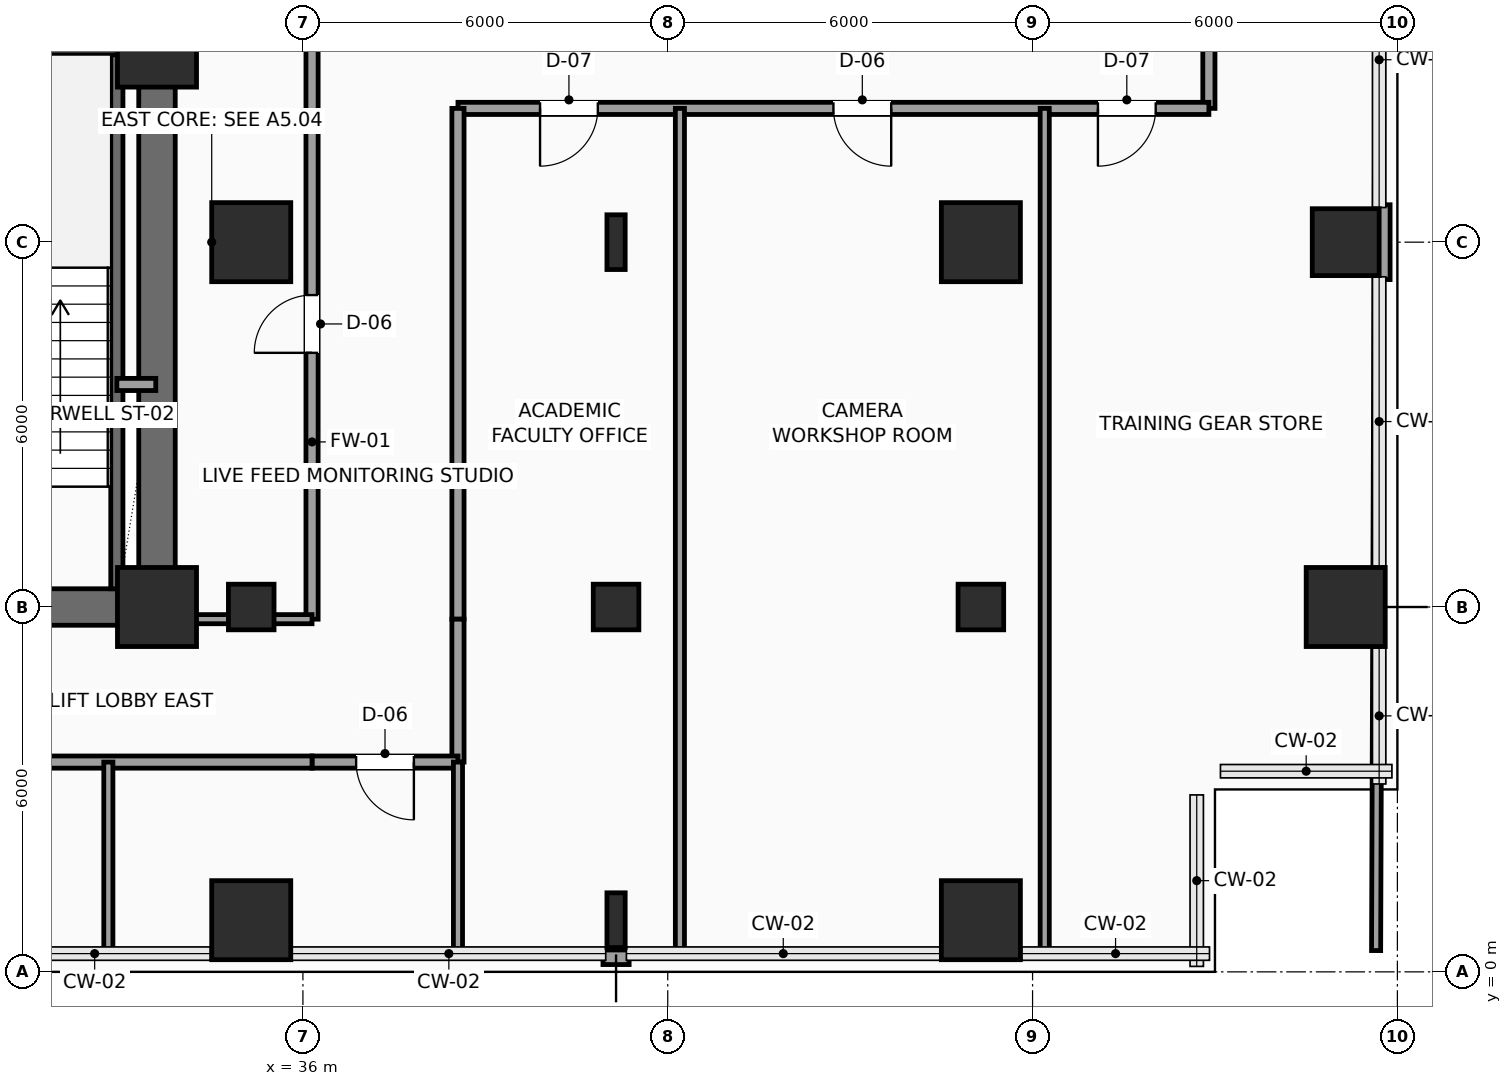
"""IFC4 building model, lengths in metres.
Left out: names, types, materials, properties, quantities, classifications, styles, units other than length and angle.
Written with IfcOpenShell. Run it as: python <this file> out.ifc"""

import sys

from ifc_helpers import new_model, si_unit, direction, frame, frame_2d, origin, origin_2d, place, context, subcontext, project, spatial, rectangle, hollow_rectangle, i_section, extrude, element, fill, save


model = new_model("IFC4")
c1 = context("Model", 3, precision=1e-05, world=origin(), true_north=direction((0.0, 1.0)))
c2 = subcontext(c1, "Body", "Model", "MODEL_VIEW")
j1 = project(units=[si_unit("LENGTHUNIT", "METRE"), si_unit("PLANEANGLEUNIT", "RADIAN")], contexts=[c1])
p1 = place(None, origin())
s1 = spatial("IfcSite", under=j1, at=p1, CompositionType="ELEMENT")
p2 = place(p1, origin())
s2 = spatial("IfcBuilding", under=s1, at=p2, CompositionType="ELEMENT")
p3 = place(p2, frame((0.0, 0.0, 63.6)))
s3 = spatial("IfcBuildingStorey", under=s2, at=p3, CompositionType="ELEMENT", Elevation=63.6)
for number, where, z_axis, x_axis in (
    (1, (33.6, 6.0, 0.0), (0.0, 0.0, 1.0), (1.0, 0.0, 0.0)),
    (2, (33.6, 15.2, 0.0), (0.0, 0.0, 1.0), (1.0, 0.0, 0.0)),
    (3, (35.15, 0.85, 0.0), (0.0, 0.0, 1.0), (1.0, 0.0, 0.0)),
):
    element("IfcColumn", number, at=place(p3, frame(where, z_axis=z_axis, x_axis=x_axis)), inside=s3, PredefinedType="COLUMN", context=c2, shape_type="SweptSolid", body=[
        extrude(rectangle(XDim=1.3, YDim=1.3, at=origin_2d()), origin(), (0.0, 0.0, 1.0), 3.9),
    ])
p4 = place(p3, frame((35.15, 6.0, 0.0), z_axis=(0.0, 0.0, 1.0), x_axis=(1.0, 0.0, 0.0)))
e4 = element("IfcColumn", 4, at=p4, inside=s3, PredefinedType="COLUMN", context=c2, shape_type="SweptSolid", body=[
    extrude(hollow_rectangle(XDim=0.75, YDim=0.75, WallThickness=0.035, InnerFilletRadius=0.035, OuterFilletRadius=0.05, at=origin_2d()), origin(), (0.0, 0.0, 1.0), 3.9),
])
p5 = place(p3, frame((35.15, 12.0, 0.0), z_axis=(0.0, 0.0, 1.0), x_axis=(1.0, 0.0, 0.0)))
e5 = element("IfcColumn", 5, at=p5, inside=s3, PredefinedType="COLUMN", context=c2, shape_type="SweptSolid", body=[
    extrude(rectangle(XDim=1.3, YDim=1.3, at=origin_2d()), origin(), (0.0, 0.0, 1.0), 3.9),
])
p6 = place(p3, frame((41.15, 0.85, 0.0), z_axis=(0.0, 0.0, 1.0), x_axis=(1.0, 0.0, 0.0)))
e6 = element("IfcColumn", 6, at=p6, inside=s3, PredefinedType="COLUMN", context=c2, shape_type="SweptSolid", body=[
    extrude(i_section(OverallWidth=0.3, OverallDepth=0.9, WebThickness=0.019, FlangeThickness=0.035, FilletRadius=0.03, at=origin_2d()), origin(), (0.0, 0.0, 1.0), 3.9),
])
p7 = place(p3, frame((41.15, 6.0, 0.0), z_axis=(0.0, 0.0, 1.0), x_axis=(1.0, 0.0, 0.0)))
e7 = element("IfcColumn", 7, at=p7, inside=s3, PredefinedType="COLUMN", context=c2, shape_type="SweptSolid", body=[
    extrude(hollow_rectangle(XDim=0.75, YDim=0.75, WallThickness=0.035, InnerFilletRadius=0.035, OuterFilletRadius=0.05, at=origin_2d()), origin(), (0.0, 0.0, 1.0), 3.9),
])
p8 = place(p3, frame((41.15, 12.0, 0.0), z_axis=(0.0, 0.0, 1.0), x_axis=(1.0, 0.0, 0.0)))
e8 = element("IfcColumn", 8, at=p8, inside=s3, PredefinedType="COLUMN", context=c2, shape_type="SweptSolid", body=[
    extrude(i_section(OverallWidth=0.3, OverallDepth=0.9, WebThickness=0.019, FlangeThickness=0.035, FilletRadius=0.03, at=origin_2d()), origin(), (0.0, 0.0, 1.0), 3.9),
])
p9 = place(p3, frame((47.15, 0.85, 0.0), z_axis=(0.0, 0.0, 1.0), x_axis=(1.0, 0.0, 0.0)))
e9 = element("IfcColumn", 9, at=p9, inside=s3, PredefinedType="COLUMN", context=c2, shape_type="SweptSolid", body=[
    extrude(rectangle(XDim=1.3, YDim=1.3, at=origin_2d()), origin(), (0.0, 0.0, 1.0), 3.9),
])
p10 = place(p3, frame((47.15, 6.0, 0.0), z_axis=(0.0, 0.0, 1.0), x_axis=(1.0, 0.0, 0.0)))
e10 = element("IfcColumn", 10, at=p10, inside=s3, PredefinedType="COLUMN", context=c2, shape_type="SweptSolid", body=[
    extrude(hollow_rectangle(XDim=0.75, YDim=0.75, WallThickness=0.035, InnerFilletRadius=0.035, OuterFilletRadius=0.05, at=origin_2d()), origin(), (0.0, 0.0, 1.0), 3.9),
])
for number, where, z_axis, x_axis in (
    (11, (47.15, 12.0, 0.0), (0.0, 0.0, 1.0), (1.0, 0.0, 0.0)),
    (12, (53.15, 6.0, 0.0), (0.0, 0.0, 1.0), (1.0, 0.0, 0.0)),
):
    element("IfcColumn", number, at=place(p3, frame(where, z_axis=z_axis, x_axis=x_axis)), inside=s3, PredefinedType="COLUMN", context=c2, shape_type="SweptSolid", body=[
        extrude(rectangle(XDim=1.3, YDim=1.3, at=origin_2d()), origin(), (0.0, 0.0, 1.0), 3.9),
    ])
p11 = place(p3, frame((53.15, 12.0, 0.0), z_axis=(0.0, 0.0, 1.0), x_axis=(1.0, 0.0, 0.0)))
e13 = element("IfcColumn", 13, at=p11, inside=s3, PredefinedType="COLUMN", context=c2, shape_type="SweptSolid", body=[
    extrude(rectangle(XDim=1.1, YDim=1.1, at=origin_2d()), origin(), (0.0, 0.0, 1.0), 3.9),
])
p12 = place(p3, frame((53.76, 12.615, 0.0), z_axis=(0.0, 0.0, 1.0), x_axis=(0.0, -1.0, 0.0)))
e14 = element("IfcWall", 14, at=p12, inside=s3, PredefinedType="SOLIDWALL", context=c2, shape_type="SweptSolid", body=[
    extrude(rectangle(XDim=1.23, YDim=0.24, at=frame_2d((0.615, 0.0))), origin(), (0.0, 0.0, 1.0), 3.65),
])
p13 = place(p3, frame((41.365, 0.24, 0.0), z_axis=(0.0, 0.0, 1.0), x_axis=(-1.0, 0.0, 0.0)))
e15 = element("IfcWall", 15, at=p13, inside=s3, PredefinedType="SOLIDWALL", context=c2, shape_type="SweptSolid", body=[
    extrude(rectangle(XDim=0.43, YDim=0.24, at=frame_2d((0.215, 0.0))), origin(), (0.0, 0.0, 1.0), 3.65),
])
p14 = place(p3, frame((24.0, 6.0, 0.0), z_axis=(0.0, 0.0, 1.0), x_axis=(1.0, 0.0, 0.0)))
e16 = element("IfcWall", 16, at=p14, inside=s3, PredefinedType="SHEAR", context=c2, shape_type="SweptSolid", body=[
    extrude(rectangle(XDim=9.6, YDim=0.6, at=frame_2d((4.8, 0.0))), origin(), (0.0, 0.0, 1.0), 3.65),
])
p15 = place(p3, frame((33.6, 6.0, 0.0), z_axis=(0.0, 0.0, 1.0), x_axis=(0.0, 1.0, 0.0)))
e17 = element("IfcWall", 17, at=p15, inside=s3, PredefinedType="SHEAR", context=c2, shape_type="SweptSolid", body=[
    extrude(rectangle(XDim=12.0, YDim=0.6, at=frame_2d((6.0, 0.0))), origin(), (0.0, 0.0, 1.0), 3.65),
])
p16 = place(p15, frame((10.2, 0.0, 0.0)))
e18 = element("IfcOpeningElement", 18, at=p16, cuts=e17, PredefinedType="OPENING", context=c2, shape_type="SweptSolid", body=[
    extrude(rectangle(XDim=0.9, YDim=2.15, at=frame_2d((0.45, 1.075))), frame((0.0, 0.31, 0.0), z_axis=(0.0, -1.0, 0.0), x_axis=(1.0, 0.0, 0.0)), (0.0, 0.0, 1.0), 0.62),
])
p17 = place(p3, frame((32.94, 6.3, 0.0), z_axis=(0.0, 0.0, 1.0), x_axis=(0.0, 1.0, 0.0)))
e19 = element("IfcWall", 19, at=p17, inside=s3, PredefinedType="SHEAR", context=c2, shape_type="SweptSolid", body=[
    extrude(rectangle(XDim=8.88, YDim=0.2, at=frame_2d((4.44, 0.0))), origin(), (0.0, 0.0, 1.0), 3.65),
])
p18 = place(p3, frame((29.26, 15.18, 0.0), z_axis=(0.0, 0.0, 1.0), x_axis=(1.0, 0.0, 0.0)))
e20 = element("IfcWall", 20, at=p18, inside=s3, PredefinedType="SHEAR", context=c2, shape_type="SweptSolid", body=[
    extrude(rectangle(XDim=4.04, YDim=0.2, at=frame_2d((2.02, 0.0))), origin(), (0.0, 0.0, 1.0), 3.65),
])
p19 = place(p3, frame((32.94, 9.66, 0.0), z_axis=(0.0, 0.0, 1.0), x_axis=(1.0, 0.0, 0.0)))
e21 = element("IfcWall", 21, at=p19, inside=s3, PredefinedType="SOLIDWALL", context=c2, shape_type="SweptSolid", body=[
    extrude(rectangle(XDim=0.64, YDim=0.2, at=frame_2d((0.32, 0.0))), origin(), (0.0, 0.0, 1.0), 3.65),
])
p20 = place(p3, frame((36.15, 5.8, 0.0), z_axis=(0.0, 0.0, 1.0), x_axis=(0.0, 1.0, 0.0)))
e22 = element("IfcWall", 22, at=p20, inside=s3, PredefinedType="SOLIDWALL", context=c2, shape_type="SweptSolid", body=[
    extrude(rectangle(XDim=10.08, YDim=0.2, at=frame_2d((5.04, 0.0))), origin(), (0.0, 0.0, 1.0), 3.65),
])
p21 = place(p20, frame((4.38, 0.0, 0.0)))
e23 = element("IfcOpeningElement", 23, at=p21, cuts=e22, PredefinedType="OPENING", context=c2, shape_type="SweptSolid", body=[
    extrude(rectangle(XDim=0.95, YDim=2.15, at=frame_2d((0.475, 1.075))), frame((0.0, 0.11, 0.0), z_axis=(0.0, -1.0, 0.0), x_axis=(1.0, 0.0, 0.0)), (0.0, 0.0, 1.0), 0.22),
])
p22 = place(p3, frame((50.9, 16.55, 0.0), z_axis=(0.0, 0.0, 1.0), x_axis=(0.0, -1.0, 0.0)))
e24 = element("IfcWall", 24, at=p22, inside=s3, PredefinedType="SOLIDWALL", context=c2, shape_type="SweptSolid", body=[
    extrude(rectangle(XDim=2.35, YDim=0.2, at=frame_2d((1.175, 0.0))), origin(), (0.0, 0.0, 1.0), 3.65),
])
p23 = place(p3, frame((50.9, 14.2, 0.0), z_axis=(0.0, 0.0, 1.0), x_axis=(-1.0, 0.0, 0.0)))
e25 = element("IfcWall", 25, at=p23, inside=s3, PredefinedType="SOLIDWALL", context=c2, shape_type="SweptSolid", body=[
    extrude(rectangle(XDim=12.35, YDim=0.2, at=frame_2d((6.175, 0.0))), origin(), (0.0, 0.0, 1.0), 3.65),
])
p24 = place(p23, frame((10.05, 0.0, 0.0)))
e26 = element("IfcOpeningElement", 26, at=p24, cuts=e25, PredefinedType="OPENING", context=c2, shape_type="SweptSolid", body=[
    extrude(rectangle(XDim=0.95, YDim=2.15, at=frame_2d((0.475, 1.075))), frame((0.0, 0.11, 0.0), z_axis=(0.0, -1.0, 0.0), x_axis=(1.0, 0.0, 0.0)), (0.0, 0.0, 1.0), 0.22),
])
p25 = place(p23, frame((5.225, 0.0, 0.0)))
e27 = element("IfcOpeningElement", 27, at=p25, cuts=e25, PredefinedType="OPENING", context=c2, shape_type="SweptSolid", body=[
    extrude(rectangle(XDim=0.95, YDim=2.15, at=frame_2d((0.475, 1.075))), frame((0.0, 0.11, 0.0), z_axis=(0.0, -1.0, 0.0), x_axis=(1.0, 0.0, 0.0)), (0.0, 0.0, 1.0), 0.22),
])
p26 = place(p23, frame((0.875, 0.0, 0.0)))
e28 = element("IfcOpeningElement", 28, at=p26, cuts=e25, PredefinedType="OPENING", context=c2, shape_type="SweptSolid", body=[
    extrude(rectangle(XDim=0.95, YDim=2.15, at=frame_2d((0.475, 1.075))), frame((0.0, 0.11, 0.0), z_axis=(0.0, -1.0, 0.0), x_axis=(1.0, 0.0, 0.0)), (0.0, 0.0, 1.0), 0.22),
])
p27 = place(p3, frame((38.55, 14.2, 0.0), z_axis=(0.0, 0.0, 1.0), x_axis=(0.0, -1.0, 0.0)))
e29 = element("IfcWall", 29, at=p27, inside=s3, PredefinedType="SOLIDWALL", context=c2, shape_type="SweptSolid", body=[
    extrude(rectangle(XDim=8.4, YDim=0.2, at=frame_2d((4.2, 0.0))), origin(), (0.0, 0.0, 1.0), 3.65),
])
p28 = place(p3, frame((38.55, 5.8, 0.0), z_axis=(0.0, 0.0, 1.0), x_axis=(0.0, -1.0, 0.0)))
e30 = element("IfcWall", 30, at=p28, inside=s3, PredefinedType="SOLIDWALL", context=c2, shape_type="SweptSolid", body=[
    extrude(rectangle(XDim=2.35, YDim=0.2, at=frame_2d((1.175, 0.0))), origin(), (0.0, 0.0, 1.0), 3.65),
])
p29 = place(p3, frame((38.55, 3.45, 0.0), z_axis=(0.0, 0.0, 1.0), x_axis=(-1.0, 0.0, 0.0)))
e31 = element("IfcWall", 31, at=p29, inside=s3, PredefinedType="SOLIDWALL", context=c2, shape_type="SweptSolid", body=[
    extrude(rectangle(XDim=2.4, YDim=0.2, at=frame_2d((1.2, 0.0))), origin(), (0.0, 0.0, 1.0), 3.142),
])
p30 = place(p29, frame((0.725, 0.0, 0.0)))
e32 = element("IfcOpeningElement", 32, at=p30, cuts=e31, PredefinedType="OPENING", context=c2, shape_type="SweptSolid", body=[
    extrude(rectangle(XDim=0.95, YDim=2.15, at=frame_2d((0.475, 1.075))), frame((0.0, 0.11, 0.0), z_axis=(0.0, -1.0, 0.0), x_axis=(1.0, 0.0, 0.0)), (0.0, 0.0, 1.0), 0.22),
])
p31 = place(p3, frame((36.15, 3.45, 0.0), z_axis=(0.0, 0.0, 1.0), x_axis=(-1.0, 0.0, 0.0)))
e33 = element("IfcWall", 33, at=p31, inside=s3, PredefinedType="SOLIDWALL", context=c2, shape_type="SweptSolid", body=[
    extrude(rectangle(XDim=14.6, YDim=0.2, at=frame_2d((7.3, 0.0))), origin(), (0.0, 0.0, 1.0), 3.142),
])
p32 = place(p31, frame((11.3, 0.0, 0.0)))
e34 = element("IfcOpeningElement", 34, at=p32, cuts=e33, PredefinedType="OPENING", context=c2, shape_type="SweptSolid", body=[
    extrude(rectangle(XDim=0.95, YDim=2.15, at=frame_2d((0.475, 1.075))), frame((0.0, 0.11, 0.0), z_axis=(0.0, -1.0, 0.0), x_axis=(1.0, 0.0, 0.0)), (0.0, 0.0, 1.0), 0.22),
])
p33 = place(p31, frame((5.675, 0.0, 0.0)))
e35 = element("IfcOpeningElement", 35, at=p33, cuts=e33, PredefinedType="OPENING", context=c2, shape_type="SweptSolid", body=[
    extrude(rectangle(XDim=0.95, YDim=2.15, at=frame_2d((0.475, 1.075))), frame((0.0, 0.11, 0.0), z_axis=(0.0, -1.0, 0.0), x_axis=(1.0, 0.0, 0.0)), (0.0, 0.0, 1.0), 0.22),
])
for number, where, z_axis, x_axis in (
    (36, (42.2, 0.3, 0.0), (0.0, 0.0, 1.0), (0.0, 1.0, 0.0)),
    (37, (48.2, 0.3, 0.0), (0.0, 0.0, 1.0), (0.0, 1.0, 0.0)),
):
    element("IfcWall", number, at=place(p3, frame(where, z_axis=z_axis, x_axis=x_axis)), inside=s3, PredefinedType="PARTITIONING", context=c2, shape_type="SweptSolid", body=[
        extrude(rectangle(XDim=13.9, YDim=0.15, at=frame_2d((6.95, 0.0))), origin(), (0.0, 0.0, 1.0), 3.65),
    ])
p34 = place(p3, frame((53.65, 0.35, 0.0), z_axis=(0.0, 0.0, 1.0), x_axis=(0.003606251025, 0.999993497456, 0.0)))
e38 = element("IfcWall", 38, at=p34, inside=s3, PredefinedType="PARTITIONING", context=c2, shape_type="SweptSolid", body=[
    extrude(rectangle(XDim=11.035, YDim=0.15, at=frame_2d((5.518, 0.0))), origin(), (0.0, 0.0, 1.0), 3.65),
])
p35 = place(p3, frame((53.694, 12.615, 0.0), z_axis=(0.0, 0.0, 1.0), x_axis=(0.003542799701, 0.999993724265, 0.0)))
e39 = element("IfcWall", 39, at=p35, inside=s3, PredefinedType="PARTITIONING", context=c2, shape_type="SweptSolid", body=[
    extrude(rectangle(XDim=1.585, YDim=0.15, at=frame_2d((0.792, 0.0))), origin(), (0.0, 0.0, 1.0), 3.65),
])
for number, where, z_axis, x_axis in (
    (40, (32.8, 0.3, 0.0), (0.0, 0.0, 1.0), (0.0, 1.0, 0.0)),
    (41, (38.55, 0.3, 0.0), (0.0, 0.0, 1.0), (0.0, 1.0, 0.0)),
):
    element("IfcWall", number, at=place(p3, frame(where, z_axis=z_axis, x_axis=x_axis)), inside=s3, PredefinedType="PARTITIONING", context=c2, shape_type="SweptSolid", body=[
        extrude(rectangle(XDim=3.15, YDim=0.15, at=frame_2d((1.575, 0.0))), origin(), (0.0, 0.0, 1.0), 3.65),
    ])
p36 = place(p3, frame((33.65, 5.8, 0.0), z_axis=(0.0, 0.0, 1.0), x_axis=(1.0, 0.0, 0.0)))
e42 = element("IfcWall", 42, at=p36, inside=s3, PredefinedType="PARTITIONING", context=c2, shape_type="SweptSolid", body=[
    extrude(rectangle(XDim=2.5, YDim=0.15, at=frame_2d((1.25, 0.0))), origin(), (0.0, 0.0, 1.0), 2.992),
])
p37 = place(p21, origin())
e43 = element("IfcDoor", 43, at=p37, inside=s3, OperationType="SINGLE_SWING_LEFT", PredefinedType="DOOR", context=c2, shape_type="SweptSolid", body=[
    extrude(rectangle(XDim=0.95, YDim=2.15, at=frame_2d((0.475, 1.075))), frame((0.0, 0.025, 0.0), z_axis=(0.0, -1.0, 0.0), x_axis=(1.0, 0.0, 0.0)), (0.0, 0.0, 1.0), 0.05),
])
fill(e23, e43)
p38 = place(p24, origin())
e44 = element("IfcDoor", 44, at=p38, inside=s3, OperationType="SINGLE_SWING_RIGHT", PredefinedType="DOOR", context=c2, shape_type="SweptSolid", body=[
    extrude(rectangle(XDim=0.95, YDim=2.15, at=frame_2d((0.475, 1.075))), frame((0.0, 0.025, 0.0), z_axis=(0.0, -1.0, 0.0), x_axis=(1.0, 0.0, 0.0)), (0.0, 0.0, 1.0), 0.05),
])
fill(e26, e44)
p39 = place(p25, origin())
e45 = element("IfcDoor", 45, at=p39, inside=s3, OperationType="SINGLE_SWING_LEFT", PredefinedType="DOOR", context=c2, shape_type="SweptSolid", body=[
    extrude(rectangle(XDim=0.95, YDim=2.15, at=frame_2d((0.475, 1.075))), frame((0.0, 0.025, 0.0), z_axis=(0.0, -1.0, 0.0), x_axis=(1.0, 0.0, 0.0)), (0.0, 0.0, 1.0), 0.05),
])
fill(e27, e45)
p40 = place(p26, origin())
e46 = element("IfcDoor", 46, at=p40, inside=s3, OperationType="SINGLE_SWING_RIGHT", PredefinedType="DOOR", context=c2, shape_type="SweptSolid", body=[
    extrude(rectangle(XDim=0.95, YDim=2.15, at=frame_2d((0.475, 1.075))), frame((0.0, 0.025, 0.0), z_axis=(0.0, -1.0, 0.0), x_axis=(1.0, 0.0, 0.0)), (0.0, 0.0, 1.0), 0.05),
])
fill(e28, e46)
p41 = place(p30, origin())
e47 = element("IfcDoor", 47, at=p41, inside=s3, OperationType="SINGLE_SWING_LEFT", PredefinedType="DOOR", context=c2, shape_type="SweptSolid", body=[
    extrude(rectangle(XDim=0.95, YDim=2.15, at=frame_2d((0.475, 1.075))), frame((0.0, 0.025, 0.0), z_axis=(0.0, -1.0, 0.0), x_axis=(1.0, 0.0, 0.0)), (0.0, 0.0, 1.0), 0.05),
])
fill(e32, e47)
save(model, sys.argv[1])
